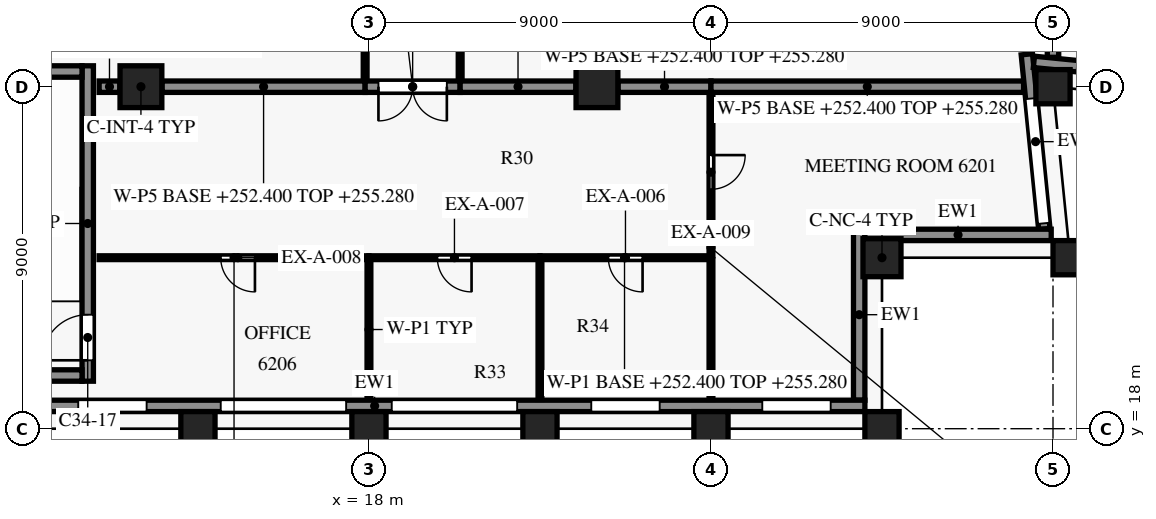
"""IFC4 building model, lengths in metres.
Left out: names, types, materials, properties, quantities, classifications, styles, units other than length and angle.
Written with IfcOpenShell. Run it as: python <this file> out.ifc"""

import sys

from ifc_helpers import new_model, si_unit, direction, frame, frame_2d, origin, origin_2d, place, context, subcontext, project, spatial, rectangle, extrude, element, fill, save


model = new_model("IFC4")
c1 = context("Model", 3, precision=1e-05, world=origin(), true_north=direction((0.0, 1.0)))
c2 = subcontext(c1, "Body", "Model", "MODEL_VIEW")
j1 = project(units=[si_unit("LENGTHUNIT", "METRE"), si_unit("PLANEANGLEUNIT", "RADIAN")], contexts=[c1])
p1 = place(None, origin())
s1 = spatial("IfcSite", under=j1, at=p1, CompositionType="ELEMENT")
p2 = place(p1, origin())
s2 = spatial("IfcBuilding", under=s1, at=p2, CompositionType="ELEMENT")
p3 = place(p2, frame((0.0, 0.0, 252.4)))
s3 = spatial("IfcBuildingStorey", under=s2, at=p3, CompositionType="ELEMENT", Elevation=252.4)
for number, where, z_axis, x_axis in (
    (1, (13.5, 18.0, 0.0), (0.0, 0.0, 1.0), (1.0, 0.0, 0.0)),
    (2, (18.0, 18.0, 0.0), (0.0, 0.0, 1.0), (1.0, 0.0, 0.0)),
    (3, (22.5, 18.0, 0.0), (0.0, 0.0, 1.0), (1.0, 0.0, 0.0)),
    (4, (27.0, 18.0, 0.0), (0.0, 0.0, 1.0), (1.0, 0.0, 0.0)),
    (5, (31.5, 18.0, 0.0), (0.0, 0.0, 1.0), (1.0, 0.0, 0.0)),
    (6, (36.45, 22.5, 0.0), (0.0, 0.0, 1.0), (-0.1, 0.995, 0.0)),
    (7, (36.0, 27.0, 0.0), (0.0, 0.0, 1.0), (-0.1, 0.995, 0.0)),
):
    element("IfcColumn", number, at=place(p3, frame(where, z_axis=z_axis, x_axis=x_axis)), inside=s3, PredefinedType="COLUMN", context=c2, shape_type="SweptSolid", body=[
        extrude(rectangle(XDim=0.9, YDim=0.9, at=origin_2d()), origin(), (0.0, 0.0, 1.0), 3.8),
    ])
p4 = place(p3, frame((31.5, 22.5, 0.0), z_axis=(0.0, 0.0, 1.0), x_axis=(1.0, 0.0, 0.0)))
e8 = element("IfcColumn", 8, at=p4, inside=s3, PredefinedType="COLUMN", context=c2, shape_type="SweptSolid", body=[
    extrude(rectangle(XDim=1.0, YDim=1.0, at=origin_2d()), origin(), (0.0, 0.0, 1.0), 3.8),
])
for number, where, z_axis, x_axis in (
    (9, (12.0, 27.0, 0.0), (0.0, 0.0, 1.0), (1.0, 0.0, 0.0)),
    (10, (24.0, 27.0, 0.0), (0.0, 0.0, 1.0), (1.0, 0.0, 0.0)),
):
    element("IfcColumn", number, at=place(p3, frame(where, z_axis=z_axis, x_axis=x_axis)), inside=s3, PredefinedType="COLUMN", context=c2, shape_type="SweptSolid", body=[
        extrude(rectangle(XDim=1.1, YDim=1.1, at=origin_2d()), origin(), (0.0, 0.0, 1.0), 3.8),
    ])
p5 = place(p3, frame((31.05, 18.6, 0.0), z_axis=(0.0, 0.0, 1.0), x_axis=(-1.0, 0.0, 0.0)))
e11 = element("IfcWall", 11, at=p5, inside=s3, PredefinedType="SOLIDWALL", context=c2, shape_type="SweptSolid", body=[
    extrude(rectangle(XDim=25.8, YDim=0.3, at=frame_2d((12.9, 0.0))), origin(), (0.0, 0.0, 1.0), 3.15),
])
p6 = place(p5, frame((0.9, 0.0, 0.75)))
e12 = element("IfcOpeningElement", 12, at=p6, cuts=e11, PredefinedType="OPENING", context=c2, shape_type="SweptSolid", body=[
    extrude(rectangle(XDim=1.8, YDim=1.8, at=frame_2d((0.9, 0.9))), frame((0.0, 0.16, 0.0), z_axis=(0.0, -1.0, 0.0), x_axis=(1.0, 0.0, 0.0)), (0.0, 0.0, 1.0), 0.32),
])
p7 = place(p5, frame((5.4, 0.0, 0.75)))
e13 = element("IfcOpeningElement", 13, at=p7, cuts=e11, PredefinedType="OPENING", context=c2, shape_type="SweptSolid", body=[
    extrude(rectangle(XDim=1.8, YDim=1.8, at=frame_2d((0.9, 0.9))), frame((0.0, 0.16, 0.0), z_axis=(0.0, -1.0, 0.0), x_axis=(1.0, 0.0, 0.0)), (0.0, 0.0, 1.0), 0.32),
])
p8 = place(p5, frame((9.15, 0.0, 0.15)))
e14 = element("IfcOpeningElement", 14, at=p8, cuts=e11, PredefinedType="OPENING", context=c2, shape_type="SweptSolid", body=[
    extrude(rectangle(XDim=3.3, YDim=2.4, at=frame_2d((1.65, 1.2))), frame((0.0, 0.16, 0.0), z_axis=(0.0, -1.0, 0.0), x_axis=(1.0, 0.0, 0.0)), (0.0, 0.0, 1.0), 0.32),
])
p9 = place(p5, frame((13.65, 0.0, 0.15)))
e15 = element("IfcOpeningElement", 15, at=p9, cuts=e11, PredefinedType="OPENING", context=c2, shape_type="SweptSolid", body=[
    extrude(rectangle(XDim=3.3, YDim=2.4, at=frame_2d((1.65, 1.2))), frame((0.0, 0.16, 0.0), z_axis=(0.0, -1.0, 0.0), x_axis=(1.0, 0.0, 0.0)), (0.0, 0.0, 1.0), 0.32),
])
p10 = place(p5, frame((18.9, 0.0, 0.75)))
e16 = element("IfcOpeningElement", 16, at=p10, cuts=e11, PredefinedType="OPENING", context=c2, shape_type="SweptSolid", body=[
    extrude(rectangle(XDim=1.8, YDim=1.8, at=frame_2d((0.9, 0.9))), frame((0.0, 0.16, 0.0), z_axis=(0.0, -1.0, 0.0), x_axis=(1.0, 0.0, 0.0)), (0.0, 0.0, 1.0), 0.32),
])
p11 = place(p3, frame((30.9, 23.25, 0.0), z_axis=(0.0, 0.0, 1.0), x_axis=(0.0, -1.0, 0.0)))
e17 = element("IfcWall", 17, at=p11, inside=s3, PredefinedType="SOLIDWALL", context=c2, shape_type="SweptSolid", body=[
    extrude(rectangle(XDim=4.5, YDim=0.3, at=frame_2d((2.25, 0.0))), origin(), (0.0, 0.0, 1.0), 3.15),
])
p12 = place(p3, frame((35.953, 23.1, 0.0), z_axis=(0.0, 0.0, 1.0), x_axis=(-1.0, 0.0, 0.0)))
e18 = element("IfcWall", 18, at=p12, inside=s3, PredefinedType="SOLIDWALL", context=c2, shape_type="SweptSolid", body=[
    extrude(rectangle(XDim=4.903, YDim=0.3, at=frame_2d((2.451, 0.0))), origin(), (0.0, 0.0, 1.0), 3.15),
])
p13 = place(p3, frame((35.312, 27.852, 0.0), z_axis=(0.0, 0.0, 1.0), x_axis=(0.099503719021, -0.99503719021, 0.0)))
e19 = element("IfcWall", 19, at=p13, inside=s3, PredefinedType="SOLIDWALL", context=c2, shape_type="SweptSolid", body=[
    extrude(rectangle(XDim=4.62, YDim=0.3, at=frame_2d((2.31, 0.0))), origin(), (0.0, 0.0, 1.0), 3.15),
])
p14 = place(p13, frame((1.17, 0.0, 0.15)))
e20 = element("IfcOpeningElement", 20, at=p14, cuts=e19, PredefinedType="OPENING", context=c2, shape_type="SweptSolid", body=[
    extrude(rectangle(XDim=3.3, YDim=2.4, at=frame_2d((1.65, 1.2))), frame((0.0, 0.16, 0.0), z_axis=(0.0, -1.0, 0.0), x_axis=(1.0, 0.0, 0.0)), (0.0, 0.0, 1.0), 0.32),
])
p15 = place(p3, frame((40.065, 27.197, 0.0), z_axis=(0.0, 0.0, 1.0), x_axis=(-0.995036663613, 0.099508984853, 0.0)))
e21 = element("IfcWall", 21, at=p15, inside=s3, PredefinedType="SOLIDWALL", context=c2, shape_type="SweptSolid", body=[
    extrude(rectangle(XDim=4.59, YDim=0.3, at=frame_2d((2.295, 0.0))), origin(), (0.0, 0.0, 1.0), 3.15),
])
p16 = place(p15, frame((0.15, 0.0, 0.15)))
e22 = element("IfcOpeningElement", 22, at=p16, cuts=e21, PredefinedType="OPENING", context=c2, shape_type="SweptSolid", body=[
    extrude(rectangle(XDim=3.3, YDim=2.4, at=frame_2d((1.65, 1.2))), frame((0.0, 0.16, 0.0), z_axis=(0.0, -1.0, 0.0), x_axis=(1.0, 0.0, 0.0)), (0.0, 0.0, 1.0), 0.32),
])
for number, where, z_axis, x_axis in (
    (23, (7.15, 19.4, 0.0), (0.0, 0.0, 1.0), (1.0, 0.0, 0.0)),
    (24, (7.15, 27.4, 0.0), (0.0, 0.0, 1.0), (1.0, 0.0, 0.0)),
):
    element("IfcWall", number, at=place(p3, frame(where, z_axis=z_axis, x_axis=x_axis)), inside=s3, PredefinedType="SHEAR", context=c2, shape_type="SweptSolid", body=[
        extrude(rectangle(XDim=3.3, YDim=0.3, at=frame_2d((1.65, 0.0))), origin(), (0.0, 0.0, 1.0), 3.5),
    ])
p17 = place(p3, frame((10.6, 19.25, 0.0), z_axis=(0.0, 0.0, 1.0), x_axis=(0.0, 1.0, 0.0)))
e25 = element("IfcWall", 25, at=p17, inside=s3, PredefinedType="SHEAR", context=c2, shape_type="SweptSolid", body=[
    extrude(rectangle(XDim=8.3, YDim=0.3, at=frame_2d((4.15, 0.0))), origin(), (0.0, 0.0, 1.0), 3.5),
])
p18 = place(p17, frame((0.55, 0.0, 0.0)))
e26 = element("IfcOpeningElement", 26, at=p18, cuts=e25, PredefinedType="OPENING", context=c2, shape_type="SweptSolid", body=[
    extrude(rectangle(XDim=1.2, YDim=2.2, at=frame_2d((0.6, 1.1))), frame((0.0, 0.16, 0.0), z_axis=(0.0, -1.0, 0.0), x_axis=(1.0, 0.0, 0.0)), (0.0, 0.0, 1.0), 0.32),
])
for number, where, z_axis, x_axis in (
    (27, (18.0, 18.77, 0.0), (0.0, 0.0, 1.0), (0.0, 1.0, 0.0)),
    (28, (22.5, 18.77, 0.0), (0.0, 0.0, 1.0), (0.0, 1.0, 0.0)),
    (29, (27.0, 22.45, 0.0), (0.0, 0.0, 1.0), (0.0, -1.0, 0.0)),
):
    element("IfcWall", number, at=place(p3, frame(where, z_axis=z_axis, x_axis=x_axis)), inside=s3, PredefinedType="PARTITIONING", context=c2, shape_type="SweptSolid", body=[
        extrude(rectangle(XDim=3.68, YDim=0.1, at=frame_2d((1.84, 0.0))), origin(), (0.0, 0.0, 1.0), 3.48),
    ])
p19 = place(p3, frame((18.0, 22.5, 0.0), z_axis=(0.0, 0.0, 1.0), x_axis=(-1.0, 0.0, 0.0)))
e30 = element("IfcWall", 30, at=p19, inside=s3, PredefinedType="PARTITIONING", context=c2, shape_type="SweptSolid", body=[
    extrude(rectangle(XDim=7.1, YDim=0.1, at=frame_2d((3.55, 0.0))), origin(), (0.0, 0.0, 1.0), 2.88),
])
p20 = place(p19, frame((3.0, 0.0, 0.0)))
e31 = element("IfcOpeningElement", 31, at=p20, cuts=e30, PredefinedType="OPENING", context=c2, shape_type="SweptSolid", body=[
    extrude(rectangle(XDim=0.9, YDim=2.1, at=frame_2d((0.45, 1.05))), frame((0.0, 0.06, 0.0), z_axis=(0.0, -1.0, 0.0), x_axis=(1.0, 0.0, 0.0)), (0.0, 0.0, 1.0), 0.12),
])
p21 = place(p3, frame((22.5, 22.5, 0.0), z_axis=(0.0, 0.0, 1.0), x_axis=(-1.0, 0.0, 0.0)))
e32 = element("IfcWall", 32, at=p21, inside=s3, PredefinedType="PARTITIONING", context=c2, shape_type="SweptSolid", body=[
    extrude(rectangle(XDim=4.5, YDim=0.1, at=frame_2d((2.25, 0.0))), origin(), (0.0, 0.0, 1.0), 3.48),
])
p22 = place(p21, frame((1.8, 0.0, 0.0)))
e33 = element("IfcOpeningElement", 33, at=p22, cuts=e32, PredefinedType="OPENING", context=c2, shape_type="SweptSolid", body=[
    extrude(rectangle(XDim=0.9, YDim=2.1, at=frame_2d((0.45, 1.05))), frame((0.0, 0.06, 0.0), z_axis=(0.0, -1.0, 0.0), x_axis=(1.0, 0.0, 0.0)), (0.0, 0.0, 1.0), 0.12),
])
p23 = place(p3, frame((26.95, 22.5, 0.0), z_axis=(0.0, 0.0, 1.0), x_axis=(-1.0, 0.0, 0.0)))
e34 = element("IfcWall", 34, at=p23, inside=s3, PredefinedType="PARTITIONING", context=c2, shape_type="SweptSolid", body=[
    extrude(rectangle(XDim=4.45, YDim=0.1, at=frame_2d((2.225, 0.0))), origin(), (0.0, 0.0, 1.0), 2.88),
])
p24 = place(p23, frame((1.75, 0.0, 0.0)))
e35 = element("IfcOpeningElement", 35, at=p24, cuts=e34, PredefinedType="OPENING", context=c2, shape_type="SweptSolid", body=[
    extrude(rectangle(XDim=0.9, YDim=2.1, at=frame_2d((0.45, 1.05))), frame((0.0, 0.06, 0.0), z_axis=(0.0, -1.0, 0.0), x_axis=(1.0, 0.0, 0.0)), (0.0, 0.0, 1.0), 0.12),
])
p25 = place(p3, frame((27.0, 26.83, 0.0), z_axis=(0.0, 0.0, 1.0), x_axis=(0.0, -1.0, 0.0)))
e36 = element("IfcWall", 36, at=p25, inside=s3, PredefinedType="PARTITIONING", context=c2, shape_type="SweptSolid", body=[
    extrude(rectangle(XDim=4.28, YDim=0.1, at=frame_2d((2.14, 0.0))), origin(), (0.0, 0.0, 1.0), 2.88),
])
p26 = place(p25, frame((1.63, 0.0, 0.0)))
e37 = element("IfcOpeningElement", 37, at=p26, cuts=e36, PredefinedType="OPENING", context=c2, shape_type="SweptSolid", body=[
    extrude(rectangle(XDim=0.9, YDim=2.1, at=frame_2d((0.45, 1.05))), frame((0.0, 0.06, 0.0), z_axis=(0.0, -1.0, 0.0), x_axis=(1.0, 0.0, 0.0)), (0.0, 0.0, 1.0), 0.12),
])
p27 = place(p3, frame((10.9, 27.0, 0.0), z_axis=(0.0, 0.0, 1.0), x_axis=(1.0, 0.0, 0.0)))
e38 = element("IfcWall", 38, at=p27, inside=s3, PredefinedType="PARTITIONING", context=c2, shape_type="SweptSolid", body=[
    extrude(rectangle(XDim=0.545, YDim=0.3, at=frame_2d((0.272, 0.0))), origin(), (0.0, 0.0, 1.0), 3.48),
])
p28 = place(p3, frame((12.555, 27.0, 0.0), z_axis=(0.0, 0.0, 1.0), x_axis=(1.0, 0.0, 0.0)))
e39 = element("IfcWall", 39, at=p28, inside=s3, PredefinedType="PARTITIONING", context=c2, shape_type="SweptSolid", body=[
    extrude(rectangle(XDim=5.345, YDim=0.3, at=frame_2d((2.672, 0.0))), origin(), (0.0, 0.0, 1.0), 2.88),
])
p29 = place(p3, frame((20.4, 27.0, 0.0), z_axis=(0.0, 0.0, 1.0), x_axis=(-1.0, 0.0, 0.0)))
e40 = element("IfcWall", 40, at=p29, inside=s3, PredefinedType="PARTITIONING", context=c2, shape_type="SweptSolid", body=[
    extrude(rectangle(XDim=2.5, YDim=0.3, at=frame_2d((1.25, 0.0))), origin(), (0.0, 0.0, 1.0), 2.88),
])
p30 = place(p29, frame((0.35, 0.0, 0.0)))
e41 = element("IfcOpeningElement", 41, at=p30, cuts=e40, PredefinedType="OPENING", context=c2, shape_type="SweptSolid", body=[
    extrude(rectangle(XDim=1.8, YDim=2.1, at=frame_2d((0.9, 1.05))), frame((0.0, 0.16, 0.0), z_axis=(0.0, -1.0, 0.0), x_axis=(1.0, 0.0, 0.0)), (0.0, 0.0, 1.0), 0.32),
])
p31 = place(p3, frame((20.4, 27.0, 0.0), z_axis=(0.0, 0.0, 1.0), x_axis=(1.0, 0.0, 0.0)))
e42 = element("IfcWall", 42, at=p31, inside=s3, PredefinedType="PARTITIONING", context=c2, shape_type="SweptSolid", body=[
    extrude(rectangle(XDim=3.045, YDim=0.3, at=frame_2d((1.522, 0.0))), origin(), (0.0, 0.0, 1.0), 2.88),
])
p32 = place(p3, frame((24.555, 27.0, 0.0), z_axis=(0.0, 0.0, 1.0), x_axis=(1.0, 0.0, 0.0)))
e43 = element("IfcWall", 43, at=p32, inside=s3, PredefinedType="PARTITIONING", context=c2, shape_type="SweptSolid", body=[
    extrude(rectangle(XDim=2.445, YDim=0.3, at=frame_2d((1.223, 0.0))), origin(), (0.0, 0.0, 1.0), 2.88),
])
p33 = place(p3, frame((27.0, 27.0, 0.0), z_axis=(0.0, 0.0, 1.0), x_axis=(1.0, 0.0, 0.0)))
e44 = element("IfcWall", 44, at=p33, inside=s3, PredefinedType="PARTITIONING", context=c2, shape_type="SweptSolid", body=[
    extrude(rectangle(XDim=8.226, YDim=0.3, at=frame_2d((4.113, 0.0))), origin(), (0.0, 0.0, 1.0), 2.88),
])
p34 = place(p3, frame((17.9, 27.17, 0.0), z_axis=(0.0, 0.0, 1.0), x_axis=(0.0, 1.0, 0.0)))
e45 = element("IfcWall", 45, at=p34, inside=s3, PredefinedType="PARTITIONING", context=c2, shape_type="SweptSolid", body=[
    extrude(rectangle(XDim=6.28, YDim=0.1, at=frame_2d((3.14, 0.0))), origin(), (0.0, 0.0, 1.0), 2.88),
])
p35 = place(p3, frame((36.0, 27.774, 0.0), z_axis=(0.0, 0.0, 1.0), x_axis=(0.0, 1.0, 0.0)))
e46 = element("IfcWall", 46, at=p35, inside=s3, PredefinedType="PARTITIONING", context=c2, shape_type="SweptSolid", body=[
    extrude(rectangle(XDim=8.176, YDim=0.3, at=frame_2d((4.088, 0.0))), origin(), (0.0, 0.0, 1.0), 2.88),
])
p36 = place(p3, frame((20.4, 33.45, 0.0), z_axis=(0.0, 0.0, 1.0), x_axis=(0.0, -1.0, 0.0)))
e47 = element("IfcWall", 47, at=p36, inside=s3, PredefinedType="PARTITIONING", context=c2, shape_type="SweptSolid", body=[
    extrude(rectangle(XDim=6.28, YDim=0.1, at=frame_2d((3.14, 0.0))), origin(), (0.0, 0.0, 1.0), 2.88),
])
p37 = place(p6, origin())
e48 = element("IfcWindow", 48, at=p37, inside=s3, PartitioningType="SINGLE_PANEL", PredefinedType="WINDOW", context=c2, shape_type="SweptSolid", body=[
    extrude(rectangle(XDim=1.8, YDim=1.8, at=frame_2d((0.9, 0.9))), frame((0.0, 0.03, 0.0), z_axis=(0.0, -1.0, 0.0), x_axis=(1.0, 0.0, 0.0)), (0.0, 0.0, 1.0), 0.06),
])
fill(e12, e48)
p38 = place(p7, origin())
e49 = element("IfcWindow", 49, at=p38, inside=s3, PartitioningType="SINGLE_PANEL", PredefinedType="WINDOW", context=c2, shape_type="SweptSolid", body=[
    extrude(rectangle(XDim=1.8, YDim=1.8, at=frame_2d((0.9, 0.9))), frame((0.0, 0.03, 0.0), z_axis=(0.0, -1.0, 0.0), x_axis=(1.0, 0.0, 0.0)), (0.0, 0.0, 1.0), 0.06),
])
fill(e13, e49)
p39 = place(p8, origin())
e50 = element("IfcWindow", 50, at=p39, inside=s3, PartitioningType="SINGLE_PANEL", PredefinedType="WINDOW", context=c2, shape_type="SweptSolid", body=[
    extrude(rectangle(XDim=3.3, YDim=2.4, at=frame_2d((1.65, 1.2))), frame((0.0, 0.03, 0.0), z_axis=(0.0, -1.0, 0.0), x_axis=(1.0, 0.0, 0.0)), (0.0, 0.0, 1.0), 0.06),
])
fill(e14, e50)
p40 = place(p9, origin())
e51 = element("IfcWindow", 51, at=p40, inside=s3, PartitioningType="SINGLE_PANEL", PredefinedType="WINDOW", context=c2, shape_type="SweptSolid", body=[
    extrude(rectangle(XDim=3.3, YDim=2.4, at=frame_2d((1.65, 1.2))), frame((0.0, 0.03, 0.0), z_axis=(0.0, -1.0, 0.0), x_axis=(1.0, 0.0, 0.0)), (0.0, 0.0, 1.0), 0.06),
])
fill(e15, e51)
p41 = place(p10, origin())
e52 = element("IfcWindow", 52, at=p41, inside=s3, PartitioningType="SINGLE_PANEL", PredefinedType="WINDOW", context=c2, shape_type="SweptSolid", body=[
    extrude(rectangle(XDim=1.8, YDim=1.8, at=frame_2d((0.9, 0.9))), frame((0.0, 0.03, 0.0), z_axis=(0.0, -1.0, 0.0), x_axis=(1.0, 0.0, 0.0)), (0.0, 0.0, 1.0), 0.06),
])
fill(e16, e52)
p42 = place(p14, origin())
e53 = element("IfcWindow", 53, at=p42, inside=s3, PartitioningType="SINGLE_PANEL", PredefinedType="WINDOW", context=c2, shape_type="SweptSolid", body=[
    extrude(rectangle(XDim=3.3, YDim=2.4, at=frame_2d((1.65, 1.2))), frame((0.0, 0.03, 0.0), z_axis=(0.0, -1.0, 0.0), x_axis=(1.0, 0.0, 0.0)), (0.0, 0.0, 1.0), 0.06),
])
fill(e20, e53)
p43 = place(p18, origin())
e54 = element("IfcDoor", 54, at=p43, inside=s3, OperationType="SINGLE_SWING_RIGHT", PredefinedType="DOOR", context=c2, shape_type="SweptSolid", body=[
    extrude(rectangle(XDim=1.2, YDim=2.2, at=frame_2d((0.6, 1.1))), frame((0.0, 0.025, 0.0), z_axis=(0.0, -1.0, 0.0), x_axis=(1.0, 0.0, 0.0)), (0.0, 0.0, 1.0), 0.05),
])
fill(e26, e54)
p44 = place(p24, origin())
e55 = element("IfcDoor", 55, at=p44, inside=s3, OperationType="SINGLE_SWING_LEFT", PredefinedType="DOOR", context=c2, shape_type="SweptSolid", body=[
    extrude(rectangle(XDim=0.9, YDim=2.1, at=frame_2d((0.45, 1.05))), frame((0.0, 0.025, 0.0), z_axis=(0.0, -1.0, 0.0), x_axis=(1.0, 0.0, 0.0)), (0.0, 0.0, 1.0), 0.05),
])
fill(e35, e55)
p45 = place(p22, origin())
e56 = element("IfcDoor", 56, at=p45, inside=s3, OperationType="SINGLE_SWING_LEFT", PredefinedType="DOOR", context=c2, shape_type="SweptSolid", body=[
    extrude(rectangle(XDim=0.9, YDim=2.1, at=frame_2d((0.45, 1.05))), frame((0.0, 0.025, 0.0), z_axis=(0.0, -1.0, 0.0), x_axis=(1.0, 0.0, 0.0)), (0.0, 0.0, 1.0), 0.05),
])
fill(e33, e56)
p46 = place(p20, origin())
e57 = element("IfcDoor", 57, at=p46, inside=s3, OperationType="SINGLE_SWING_LEFT", PredefinedType="DOOR", context=c2, shape_type="SweptSolid", body=[
    extrude(rectangle(XDim=0.9, YDim=2.1, at=frame_2d((0.45, 1.05))), frame((0.0, 0.025, 0.0), z_axis=(0.0, -1.0, 0.0), x_axis=(1.0, 0.0, 0.0)), (0.0, 0.0, 1.0), 0.05),
])
fill(e31, e57)
p47 = place(p26, origin())
e58 = element("IfcDoor", 58, at=p47, inside=s3, OperationType="SINGLE_SWING_LEFT", PredefinedType="DOOR", context=c2, shape_type="SweptSolid", body=[
    extrude(rectangle(XDim=0.9, YDim=2.1, at=frame_2d((0.45, 1.05))), frame((0.0, 0.025, 0.0), z_axis=(0.0, -1.0, 0.0), x_axis=(1.0, 0.0, 0.0)), (0.0, 0.0, 1.0), 0.05),
])
fill(e37, e58)
p48 = place(p30, origin())
e59 = element("IfcDoor", 59, at=p48, inside=s3, OperationType="DOUBLE_DOOR_SINGLE_SWING", PredefinedType="DOOR", context=c2, shape_type="SweptSolid", body=[
    extrude(rectangle(XDim=1.8, YDim=2.1, at=frame_2d((0.9, 1.05))), frame((0.0, 0.025, 0.0), z_axis=(0.0, -1.0, 0.0), x_axis=(1.0, 0.0, 0.0)), (0.0, 0.0, 1.0), 0.05),
])
fill(e41, e59)
save(model, sys.argv[1])
